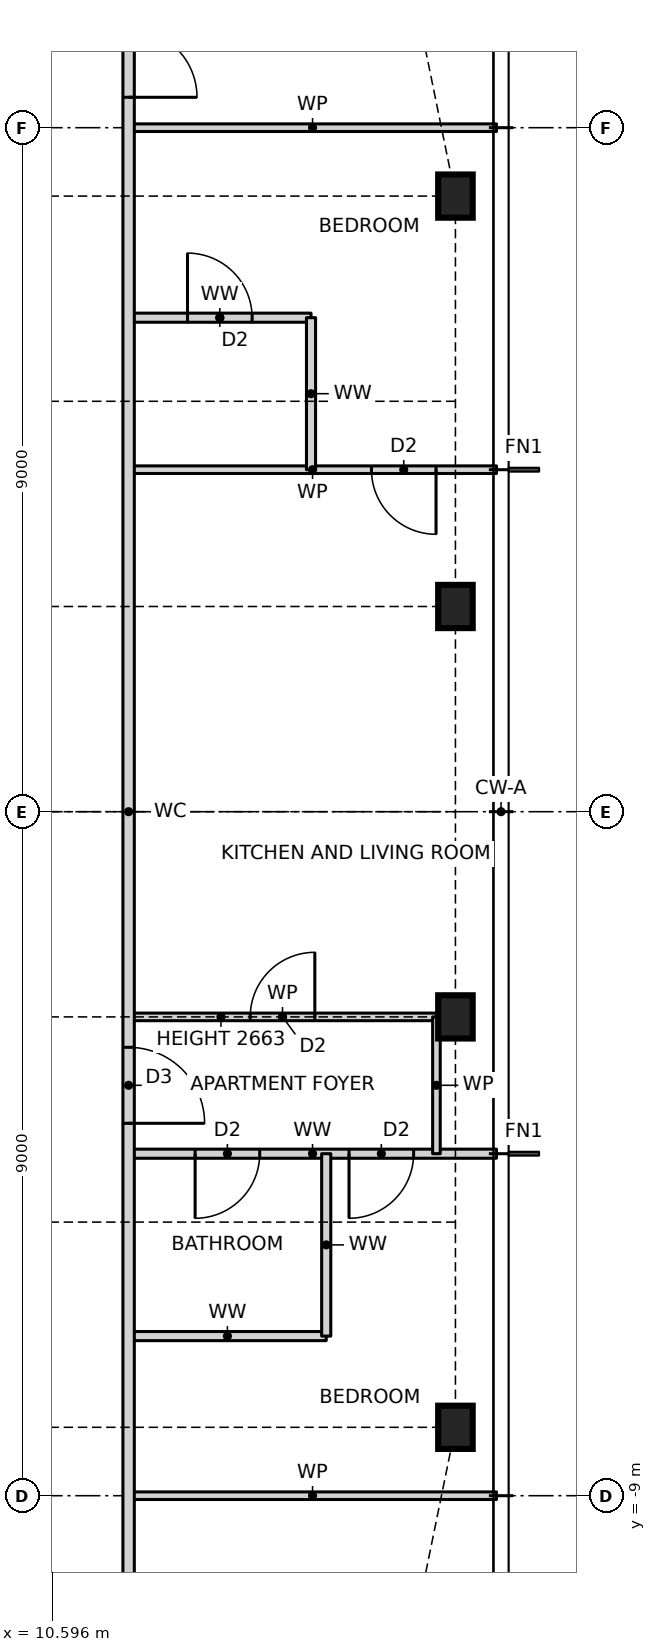
"""IFC4 building model, lengths in metres.
Left out: names, types, materials, properties, quantities, classifications, styles, units other than length and angle.
Written with IfcOpenShell. Run it as: python <this file> out.ifc"""

import sys

from ifc_helpers import new_model, si_unit, direction, frame, frame_2d, origin, origin_2d, place, context, subcontext, project, spatial, rectangle, i_section, extrude, element, fill, save


model = new_model("IFC4")
c1 = context("Model", 3, precision=1e-05, world=origin(), true_north=direction((0.0, 1.0)))
c2 = subcontext(c1, "Body", "Model", "MODEL_VIEW")
j1 = project(units=[si_unit("LENGTHUNIT", "METRE"), si_unit("PLANEANGLEUNIT", "RADIAN")], contexts=[c1])
p1 = place(None, origin())
s1 = spatial("IfcSite", under=j1, at=p1, CompositionType="ELEMENT")
p2 = place(p1, origin())
s2 = spatial("IfcBuilding", under=s1, at=p2, CompositionType="ELEMENT")
p3 = place(p2, frame((0.0, 0.0, 239.5)))
s3 = spatial("IfcBuildingStorey", under=s2, at=p3, CompositionType="ELEMENT", Elevation=239.5)
for number, where, z_axis, x_axis in (
    (1, (15.9, -8.1, 0.0), (0.0, 0.0, 1.0), (1.0, 0.0, 0.0)),
    (2, (15.9, -2.7, 0.0), (0.0, 0.0, 1.0), (1.0, 0.0, 0.0)),
    (3, (15.9, 2.7, 0.0), (0.0, 0.0, 1.0), (1.0, 0.0, 0.0)),
    (4, (15.9, 8.1, 0.0), (0.0, 0.0, 1.0), (1.0, 0.0, 0.0)),
):
    element("IfcColumn", number, at=place(p3, frame(where, z_axis=z_axis, x_axis=x_axis)), inside=s3, PredefinedType="COLUMN", context=c2, shape_type="SweptSolid", body=[
        extrude(i_section(OverallWidth=0.455, OverallDepth=0.569, WebThickness=0.078, FlangeThickness=0.125, at=origin_2d()), origin(), (0.0, 0.0, 1.0), 3.5),
    ])
p4 = place(p3, frame((11.6, -9.0, 0.0), z_axis=(0.0, 0.0, 1.0), x_axis=(1.0, 0.0, 0.0)))
e5 = element("IfcWall", 5, at=p4, inside=s3, PredefinedType="PARTITIONING", context=c2, shape_type="SweptSolid", body=[
    extrude(rectangle(XDim=4.84, YDim=0.1, at=frame_2d((2.42, 0.0))), origin(), (0.0, 0.0, 1.0), 3.27),
])
p5 = place(p3, frame((11.6, -6.9, 0.0), z_axis=(0.0, 0.0, 1.0), x_axis=(1.0, 0.0, 0.0)))
e6 = element("IfcWall", 6, at=p5, inside=s3, PredefinedType="PARTITIONING", context=c2, shape_type="SweptSolid", body=[
    extrude(rectangle(XDim=2.6, YDim=0.12, at=frame_2d((1.3, 0.0))), origin(), (0.0, 0.0, 1.0), 3.27),
])
p6 = place(p3, frame((11.6, -4.5, 0.0), z_axis=(0.0, 0.0, 1.0), x_axis=(1.0, 0.0, 0.0)))
e7 = element("IfcWall", 7, at=p6, inside=s3, PredefinedType="PARTITIONING", context=c2, shape_type="SweptSolid", body=[
    extrude(rectangle(XDim=4.84, YDim=0.12, at=frame_2d((2.42, 0.0))), origin(), (0.0, 0.0, 1.0), 3.27),
])
p7 = place(p6, frame((2.9, 0.0, 0.0)))
e8 = element("IfcOpeningElement", 8, at=p7, cuts=e7, PredefinedType="OPENING", context=c2, shape_type="SweptSolid", body=[
    extrude(rectangle(XDim=0.85, YDim=2.1, at=frame_2d((0.425, 1.05))), frame((0.0, 0.07, 0.0), z_axis=(0.0, -1.0, 0.0), x_axis=(1.0, 0.0, 0.0)), (0.0, 0.0, 1.0), 0.14),
])
p8 = place(p6, frame((0.875, 0.0, 0.0)))
e9 = element("IfcOpeningElement", 9, at=p8, cuts=e7, PredefinedType="OPENING", context=c2, shape_type="SweptSolid", body=[
    extrude(rectangle(XDim=0.85, YDim=2.1, at=frame_2d((0.425, 1.05))), frame((0.0, 0.07, 0.0), z_axis=(0.0, -1.0, 0.0), x_axis=(1.0, 0.0, 0.0)), (0.0, 0.0, 1.0), 0.14),
])
p9 = place(p3, frame((11.6, -2.7, 0.0), z_axis=(0.0, 0.0, 1.0), x_axis=(1.0, 0.0, 0.0)))
e10 = element("IfcWall", 10, at=p9, inside=s3, PredefinedType="PARTITIONING", context=c2, shape_type="SweptSolid", body=[
    extrude(rectangle(XDim=4.05, YDim=0.1, at=frame_2d((2.025, 0.0))), origin(), (0.0, 0.0, 1.0), 2.663),
])
p10 = place(p9, frame((1.6, 0.0, 0.0)))
e11 = element("IfcOpeningElement", 11, at=p10, cuts=e10, PredefinedType="OPENING", context=c2, shape_type="SweptSolid", body=[
    extrude(rectangle(XDim=0.85, YDim=2.1, at=frame_2d((0.425, 1.05))), frame((0.0, 0.06, 0.0), z_axis=(0.0, -1.0, 0.0), x_axis=(1.0, 0.0, 0.0)), (0.0, 0.0, 1.0), 0.12),
])
p11 = place(p3, frame((11.6, 4.5, 0.0), z_axis=(0.0, 0.0, 1.0), x_axis=(1.0, 0.0, 0.0)))
e12 = element("IfcWall", 12, at=p11, inside=s3, PredefinedType="PARTITIONING", context=c2, shape_type="SweptSolid", body=[
    extrude(rectangle(XDim=4.84, YDim=0.1, at=frame_2d((2.42, 0.0))), origin(), (0.0, 0.0, 1.0), 3.27),
])
p12 = place(p11, frame((3.195, 0.0, 0.0)))
e13 = element("IfcOpeningElement", 13, at=p12, cuts=e12, PredefinedType="OPENING", context=c2, shape_type="SweptSolid", body=[
    extrude(rectangle(XDim=0.85, YDim=2.1, at=frame_2d((0.425, 1.05))), frame((0.0, 0.06, 0.0), z_axis=(0.0, -1.0, 0.0), x_axis=(1.0, 0.0, 0.0)), (0.0, 0.0, 1.0), 0.12),
])
p13 = place(p3, frame((11.6, 6.5, 0.0), z_axis=(0.0, 0.0, 1.0), x_axis=(1.0, 0.0, 0.0)))
e14 = element("IfcWall", 14, at=p13, inside=s3, PredefinedType="PARTITIONING", context=c2, shape_type="SweptSolid", body=[
    extrude(rectangle(XDim=2.4, YDim=0.12, at=frame_2d((1.2, 0.0))), origin(), (0.0, 0.0, 1.0), 3.27),
])
p14 = place(p13, frame((0.775, 0.0, 0.0)))
e15 = element("IfcOpeningElement", 15, at=p14, cuts=e14, PredefinedType="OPENING", context=c2, shape_type="SweptSolid", body=[
    extrude(rectangle(XDim=0.85, YDim=2.1, at=frame_2d((0.425, 1.05))), frame((0.0, 0.07, 0.0), z_axis=(0.0, -1.0, 0.0), x_axis=(1.0, 0.0, 0.0)), (0.0, 0.0, 1.0), 0.14),
])
p15 = place(p3, frame((11.6, 9.0, 0.0), z_axis=(0.0, 0.0, 1.0), x_axis=(1.0, 0.0, 0.0)))
e16 = element("IfcWall", 16, at=p15, inside=s3, PredefinedType="PARTITIONING", context=c2, shape_type="SweptSolid", body=[
    extrude(rectangle(XDim=4.84, YDim=0.1, at=frame_2d((2.42, 0.0))), origin(), (0.0, 0.0, 1.0), 3.27),
])
p16 = place(p3, frame((15.65, -4.5, 0.0), z_axis=(0.0, 0.0, 1.0), x_axis=(0.0, 1.0, 0.0)))
e17 = element("IfcWall", 17, at=p16, inside=s3, PredefinedType="PARTITIONING", context=c2, shape_type="SweptSolid", body=[
    extrude(rectangle(XDim=1.8, YDim=0.1, at=frame_2d((0.9, 0.0))), origin(), (0.0, 0.0, 1.0), 3.27),
])
p17 = place(p3, frame((14.2, -6.9, 0.0), z_axis=(0.0, 0.0, 1.0), x_axis=(0.0, 1.0, 0.0)))
e18 = element("IfcWall", 18, at=p17, inside=s3, PredefinedType="PARTITIONING", context=c2, shape_type="SweptSolid", body=[
    extrude(rectangle(XDim=2.4, YDim=0.12, at=frame_2d((1.2, 0.0))), origin(), (0.0, 0.0, 1.0), 3.27),
])
p18 = place(p3, frame((14.0, 4.5, 0.0), z_axis=(0.0, 0.0, 1.0), x_axis=(0.0, 1.0, 0.0)))
e19 = element("IfcWall", 19, at=p18, inside=s3, PredefinedType="PARTITIONING", context=c2, shape_type="SweptSolid", body=[
    extrude(rectangle(XDim=2.0, YDim=0.12, at=frame_2d((1.0, 0.0))), origin(), (0.0, 0.0, 1.0), 3.27),
])
p19 = place(p3, frame((11.6, -11.6, 0.0), z_axis=(0.0, 0.0, 1.0), x_axis=(0.0, 1.0, 0.0)))
e20 = element("IfcWall", 20, at=p19, inside=s3, PredefinedType="PARTITIONING", context=c2, shape_type="SweptSolid", body=[
    extrude(rectangle(XDim=23.2, YDim=0.15, at=frame_2d((11.6, 0.0))), origin(), (0.0, 0.0, 1.0), 3.27),
])
p20 = place(p19, frame((7.5, 0.0, 0.0)))
e21 = element("IfcOpeningElement", 21, at=p20, cuts=e20, PredefinedType="OPENING", context=c2, shape_type="SweptSolid", body=[
    extrude(rectangle(XDim=1.0, YDim=2.1, at=frame_2d((0.5, 1.05))), frame((0.0, 0.085, 0.0), z_axis=(0.0, -1.0, 0.0), x_axis=(1.0, 0.0, 0.0)), (0.0, 0.0, 1.0), 0.17),
])
p21 = place(p19, frame((21.0, 0.0, 0.0)))
e22 = element("IfcOpeningElement", 22, at=p21, cuts=e20, PredefinedType="OPENING", context=c2, shape_type="SweptSolid", body=[
    extrude(rectangle(XDim=1.8, YDim=2.1, at=frame_2d((0.9, 1.05))), frame((0.0, 0.085, 0.0), z_axis=(0.0, -1.0, 0.0), x_axis=(1.0, 0.0, 0.0)), (0.0, 0.0, 1.0), 0.17),
])
p22 = place(p20, frame((1.0, 0.0, 0.0), z_axis=(0.0, 0.0, 1.0), x_axis=(-1.0, 0.0, 0.0)))
e23 = element("IfcDoor", 23, at=p22, inside=s3, OperationType="SINGLE_SWING_RIGHT", PredefinedType="DOOR", context=c2, shape_type="SweptSolid", body=[
    extrude(rectangle(XDim=1.0, YDim=2.1, at=frame_2d((0.5, 1.05))), frame((0.0, 0.025, 0.0), z_axis=(0.0, -1.0, 0.0), x_axis=(1.0, 0.0, 0.0)), (0.0, 0.0, 1.0), 0.05),
])
fill(e21, e23)
p23 = place(p10, origin())
e24 = element("IfcDoor", 24, at=p23, inside=s3, OperationType="SINGLE_SWING_RIGHT", PredefinedType="DOOR", context=c2, shape_type="SweptSolid", body=[
    extrude(rectangle(XDim=0.85, YDim=2.1, at=frame_2d((0.425, 1.05))), frame((0.0, 0.025, 0.0), z_axis=(0.0, -1.0, 0.0), x_axis=(1.0, 0.0, 0.0)), (0.0, 0.0, 1.0), 0.05),
])
fill(e11, e24)
p24 = place(p7, frame((0.85, 0.0, 0.0), z_axis=(0.0, 0.0, 1.0), x_axis=(-1.0, 0.0, 0.0)))
e25 = element("IfcDoor", 25, at=p24, inside=s3, OperationType="SINGLE_SWING_RIGHT", PredefinedType="DOOR", context=c2, shape_type="SweptSolid", body=[
    extrude(rectangle(XDim=0.85, YDim=2.1, at=frame_2d((0.425, 1.05))), frame((0.0, 0.025, 0.0), z_axis=(0.0, -1.0, 0.0), x_axis=(1.0, 0.0, 0.0)), (0.0, 0.0, 1.0), 0.05),
])
fill(e8, e25)
p25 = place(p8, frame((0.85, 0.0, 0.0), z_axis=(0.0, 0.0, 1.0), x_axis=(-1.0, 0.0, 0.0)))
e26 = element("IfcDoor", 26, at=p25, inside=s3, OperationType="SINGLE_SWING_RIGHT", PredefinedType="DOOR", context=c2, shape_type="SweptSolid", body=[
    extrude(rectangle(XDim=0.85, YDim=2.1, at=frame_2d((0.425, 1.05))), frame((0.0, 0.025, 0.0), z_axis=(0.0, -1.0, 0.0), x_axis=(1.0, 0.0, 0.0)), (0.0, 0.0, 1.0), 0.05),
])
fill(e9, e26)
p26 = place(p12, frame((0.85, 0.0, 0.0), z_axis=(0.0, 0.0, 1.0), x_axis=(-1.0, 0.0, 0.0)))
e27 = element("IfcDoor", 27, at=p26, inside=s3, OperationType="SINGLE_SWING_LEFT", PredefinedType="DOOR", context=c2, shape_type="SweptSolid", body=[
    extrude(rectangle(XDim=0.85, YDim=2.1, at=frame_2d((0.425, 1.05))), frame((0.0, 0.025, 0.0), z_axis=(0.0, -1.0, 0.0), x_axis=(1.0, 0.0, 0.0)), (0.0, 0.0, 1.0), 0.05),
])
fill(e13, e27)
p27 = place(p14, origin())
e28 = element("IfcDoor", 28, at=p27, inside=s3, OperationType="SINGLE_SWING_LEFT", PredefinedType="DOOR", context=c2, shape_type="SweptSolid", body=[
    extrude(rectangle(XDim=0.85, YDim=2.1, at=frame_2d((0.425, 1.05))), frame((0.0, 0.025, 0.0), z_axis=(0.0, -1.0, 0.0), x_axis=(1.0, 0.0, 0.0)), (0.0, 0.0, 1.0), 0.05),
])
fill(e15, e28)
p28 = place(p21, frame((1.8, 0.0, 0.0), z_axis=(0.0, 0.0, 1.0), x_axis=(-1.0, 0.0, 0.0)))
e29 = element("IfcDoor", 29, at=p28, inside=s3, OperationType="DOUBLE_DOOR_SINGLE_SWING", PredefinedType="DOOR", context=c2, shape_type="SweptSolid", body=[
    extrude(rectangle(XDim=1.8, YDim=2.1, at=frame_2d((0.9, 1.05))), frame((0.0, 0.025, 0.0), z_axis=(0.0, -1.0, 0.0), x_axis=(1.0, 0.0, 0.0)), (0.0, 0.0, 1.0), 0.05),
])
fill(e22, e29)
save(model, sys.argv[1])
